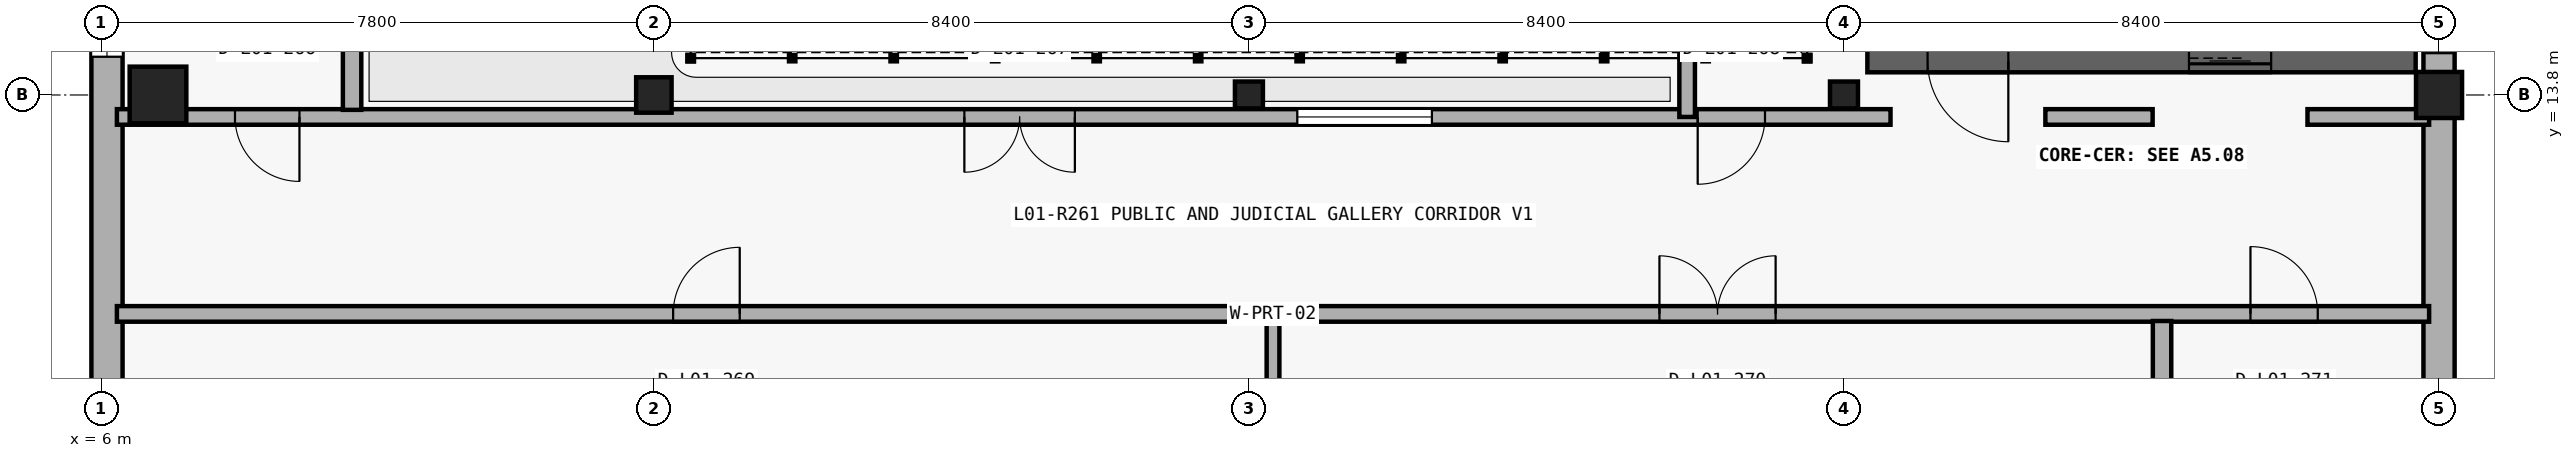
"""IFC4 building model, lengths in metres.
Left out: names, types, materials, properties, quantities, classifications, styles, units other than length and angle.
Written with IfcOpenShell. Run it as: python <this file> out.ifc"""

import sys

from ifc_helpers import new_model, si_unit, direction, frame, frame_2d, origin_with_axes, origin_2d_with_axis, place, context, subcontext, project, spatial, rectangle, circle, i_section, extrude, element, fill, save


model = new_model("IFC4")
c1 = context("Model", 3, precision=1e-05, world=origin_with_axes(), true_north=direction((0.0, 1.0)))
c2 = subcontext(c1, "Body", "Model", "MODEL_VIEW")
j1 = project(units=[si_unit("LENGTHUNIT", "METRE"), si_unit("PLANEANGLEUNIT", "RADIAN")], contexts=[c1])
p1 = place(None, origin_with_axes())
s1 = spatial("IfcSite", under=j1, at=p1, CompositionType="ELEMENT")
p2 = place(p1, origin_with_axes())
s2 = spatial("IfcBuilding", under=s1, at=p2, CompositionType="ELEMENT")
p3 = place(p2, frame((0.0, 0.0, 5.4), z_axis=(0.0, 0.0, 1.0), x_axis=(1.0, 0.0, 0.0)))
s3 = spatial("IfcBuildingStorey", under=s2, at=p3, CompositionType="ELEMENT", Elevation=5.4)
p4 = place(None, frame((39.0, 6.34, 5.4), z_axis=(0.0, 0.0, 1.0), x_axis=(0.0, 1.0, 0.0)))
e1 = element("IfcWall", 1, at=p4, inside=s3, PredefinedType="SOLIDWALL", context=c2, shape_type="SweptSolid", body=[
    extrude(rectangle(XDim=23.95, YDim=0.44, at=frame_2d((11.975, 0.0), x_axis=(1.0, 0.0))), origin_with_axes(), (0.0, 0.0, 1.0), 5.1),
])
p5 = place(None, frame((39.0, 9.015, 6.35), z_axis=(0.0, 0.0, 1.0), x_axis=(0.0, 1.0, 0.0)))
e2 = element("IfcOpeningElement", 2, at=p5, cuts=e1, PredefinedType="OPENING", context=c2, shape_type="SweptSolid", body=[
    extrude(rectangle(XDim=0.95, YDim=1.95, at=frame_2d((0.0, 0.975), x_axis=(1.0, 0.0))), frame((0.0, 0.23, 0.0), z_axis=(0.0, -1.0, 0.0), x_axis=(1.0, 0.0, 0.0)), (0.0, 0.0, 1.0), 0.46),
])
p6 = place(None, frame((39.0, 15.19, 6.25), z_axis=(0.0, 0.0, 1.0), x_axis=(0.0, 1.0, 0.0)))
e3 = element("IfcOpeningElement", 3, at=p6, cuts=e1, PredefinedType="OPENING", context=c2, shape_type="SweptSolid", body=[
    extrude(rectangle(XDim=1.6, YDim=3.1, at=frame_2d((0.0, 1.55), x_axis=(1.0, 0.0))), frame((0.0, 0.23, 0.0), z_axis=(0.0, -1.0, 0.0), x_axis=(1.0, 0.0, 0.0)), (0.0, 0.0, 1.0), 0.46),
])
p7 = place(None, frame((39.0, 18.065, 6.3), z_axis=(0.0, 0.0, 1.0), x_axis=(0.0, 1.0, 0.0)))
e4 = element("IfcOpeningElement", 4, at=p7, cuts=e1, PredefinedType="OPENING", context=c2, shape_type="SweptSolid", body=[
    extrude(rectangle(XDim=1.45, YDim=2.85, at=frame_2d((0.0, 1.425), x_axis=(1.0, 0.0))), frame((0.0, 0.23, 0.0), z_axis=(0.0, -1.0, 0.0), x_axis=(1.0, 0.0, 0.0)), (0.0, 0.0, 1.0), 0.46),
])
p8 = place(None, frame((39.0, 24.015, 6.3), z_axis=(0.0, 0.0, 1.0), x_axis=(0.0, 1.0, 0.0)))
e5 = element("IfcOpeningElement", 5, at=p8, cuts=e1, PredefinedType="OPENING", context=c2, shape_type="SweptSolid", body=[
    extrude(rectangle(XDim=1.65, YDim=2.4, at=frame_2d((0.0, 1.2), x_axis=(1.0, 0.0))), frame((0.0, 0.23, 0.0), z_axis=(0.0, -1.0, 0.0), x_axis=(1.0, 0.0, 0.0)), (0.0, 0.0, 1.0), 0.46),
])
p9 = place(None, frame((6.08, 30.34, 5.4), z_axis=(0.0, 0.0, 1.0), x_axis=(0.0, -1.0, 0.0)))
e6 = element("IfcWall", 6, at=p9, inside=s3, PredefinedType="SOLIDWALL", context=c2, shape_type="SweptSolid", body=[
    extrude(rectangle(XDim=24.0, YDim=0.44, at=frame_2d((12.0, 0.0), x_axis=(1.0, 0.0))), origin_with_axes(), (0.0, 0.0, 1.0), 5.1),
])
p10 = place(None, frame((6.08, 27.54, 6.5), z_axis=(0.0, 0.0, 1.0), x_axis=(0.0, -1.0, 0.0)))
e7 = element("IfcOpeningElement", 7, at=p10, cuts=e6, PredefinedType="OPENING", context=c2, shape_type="SweptSolid", body=[
    extrude(rectangle(XDim=1.2, YDim=3.4, at=frame_2d((0.0, 1.7), x_axis=(1.0, 0.0))), frame((0.0, 0.23, 0.0), z_axis=(0.0, -1.0, 0.0), x_axis=(1.0, 0.0, 0.0)), (0.0, 0.0, 1.0), 0.46),
])
p11 = place(None, frame((6.08, 24.14, 6.25), z_axis=(0.0, 0.0, 1.0), x_axis=(0.0, -1.0, 0.0)))
e8 = element("IfcOpeningElement", 8, at=p11, cuts=e6, PredefinedType="OPENING", context=c2, shape_type="SweptSolid", body=[
    extrude(rectangle(XDim=2.1, YDim=3.3, at=frame_2d((0.0, 1.65), x_axis=(1.0, 0.0))), frame((0.0, 0.23, 0.0), z_axis=(0.0, -1.0, 0.0), x_axis=(1.0, 0.0, 0.0)), (0.0, 0.0, 1.0), 0.46),
])
p12 = place(None, frame((6.08, 18.44, 6.3), z_axis=(0.0, 0.0, 1.0), x_axis=(0.0, -1.0, 0.0)))
e9 = element("IfcOpeningElement", 9, at=p12, cuts=e6, PredefinedType="OPENING", context=c2, shape_type="SweptSolid", body=[
    extrude(rectangle(XDim=1.8, YDim=3.0, at=frame_2d((0.0, 1.5), x_axis=(1.0, 0.0))), frame((0.0, 0.23, 0.0), z_axis=(0.0, -1.0, 0.0), x_axis=(1.0, 0.0, 0.0)), (0.0, 0.0, 1.0), 0.46),
])
p13 = place(None, frame((6.08, 15.09, 6.3), z_axis=(0.0, 0.0, 1.0), x_axis=(0.0, -1.0, 0.0)))
e10 = element("IfcOpeningElement", 10, at=p13, cuts=e6, PredefinedType="OPENING", context=c2, shape_type="SweptSolid", body=[
    extrude(rectangle(XDim=1.5, YDim=2.7, at=frame_2d((0.0, 1.35), x_axis=(1.0, 0.0))), frame((0.0, 0.23, 0.0), z_axis=(0.0, -1.0, 0.0), x_axis=(1.0, 0.0, 0.0)), (0.0, 0.0, 1.0), 0.46),
])
p14 = place(None, frame((30.93, 14.28, 5.4), z_axis=(0.0, 0.0, 1.0), x_axis=(1.0, 0.0, 0.0)))
e11 = element("IfcWall", 11, at=p14, inside=s3, PredefinedType="SHEAR", context=c2, shape_type="SweptSolid", body=[
    extrude(rectangle(XDim=7.74, YDim=0.32, at=frame_2d((3.87, 0.0), x_axis=(1.0, 0.0))), origin_with_axes(), (0.0, 0.0, 1.0), 5.4),
])
p15 = place(None, frame((32.35, 14.28, 5.4), z_axis=(0.0, 0.0, 1.0), x_axis=(1.0, 0.0, 0.0)))
e12 = element("IfcOpeningElement", 12, at=p15, cuts=e11, PredefinedType="OPENING", context=c2, shape_type="SweptSolid", body=[
    extrude(rectangle(XDim=1.14, YDim=2.18, at=frame_2d((0.0, 1.09), x_axis=(1.0, 0.0))), frame((0.0, 0.17, 0.0), z_axis=(0.0, -1.0, 0.0), x_axis=(1.0, 0.0, 0.0)), (0.0, 0.0, 1.0), 0.34),
])
p16 = place(None, frame((36.05, 14.28, 5.4), z_axis=(0.0, 0.0, 1.0), x_axis=(1.0, 0.0, 0.0)))
e13 = element("IfcOpeningElement", 13, at=p16, cuts=e11, PredefinedType="OPENING", context=c2, shape_type="SweptSolid", body=[
    extrude(rectangle(XDim=1.16, YDim=2.2, at=frame_2d((0.0, 1.1), x_axis=(1.0, 0.0))), frame((0.0, 0.17, 0.0), z_axis=(0.0, -1.0, 0.0), x_axis=(1.0, 0.0, 0.0)), (0.0, 0.0, 1.0), 0.34),
])
p17 = place(None, frame((6.22, 13.49, 5.4), z_axis=(0.0, 0.0, 1.0), x_axis=(1.0, 0.0, 0.0)))
e14 = element("IfcWall", 14, at=p17, inside=s3, PredefinedType="PARTITIONING", context=c2, shape_type="SweptSolid", body=[
    extrude(rectangle(XDim=25.037, YDim=0.22, at=frame_2d((12.518, 0.0), x_axis=(1.0, 0.0))), origin_with_axes(), (0.0, 0.0, 1.0), 5.08),
])
p18 = place(None, frame((8.342, 13.49, 5.4), z_axis=(0.0, 0.0, 1.0), x_axis=(1.0, 0.0, 0.0)))
e15 = element("IfcOpeningElement", 15, at=p18, cuts=e14, PredefinedType="OPENING", context=c2, shape_type="SweptSolid", body=[
    extrude(rectangle(XDim=0.91, YDim=2.12, at=frame_2d((0.0, 1.06), x_axis=(1.0, 0.0))), frame((0.0, 0.12, 0.0), z_axis=(0.0, -1.0, 0.0), x_axis=(1.0, 0.0, 0.0)), (0.0, 0.0, 1.0), 0.24),
])
p19 = place(None, frame((18.963, 13.49, 5.4), z_axis=(0.0, 0.0, 1.0), x_axis=(1.0, 0.0, 0.0)))
e16 = element("IfcOpeningElement", 16, at=p19, cuts=e14, PredefinedType="OPENING", context=c2, shape_type="SweptSolid", body=[
    extrude(rectangle(XDim=1.56, YDim=2.28, at=frame_2d((0.0, 1.14), x_axis=(1.0, 0.0))), frame((0.0, 0.12, 0.0), z_axis=(0.0, -1.0, 0.0), x_axis=(1.0, 0.0, 0.0)), (0.0, 0.0, 1.0), 0.24),
])
p20 = place(None, frame((29.01, 13.49, 5.4), z_axis=(0.0, 0.0, 1.0), x_axis=(1.0, 0.0, 0.0)))
e17 = element("IfcOpeningElement", 17, at=p20, cuts=e14, PredefinedType="OPENING", context=c2, shape_type="SweptSolid", body=[
    extrude(rectangle(XDim=0.95, YDim=2.16, at=frame_2d((0.0, 1.08), x_axis=(1.0, 0.0))), frame((0.0, 0.12, 0.0), z_axis=(0.0, -1.0, 0.0), x_axis=(1.0, 0.0, 0.0)), (0.0, 0.0, 1.0), 0.24),
])
p21 = place(None, frame((23.833, 13.49, 6.45), z_axis=(0.0, 0.0, 1.0), x_axis=(1.0, 0.0, 0.0)))
e18 = element("IfcOpeningElement", 18, at=p21, cuts=e14, PredefinedType="OPENING", context=c2, shape_type="SweptSolid", body=[
    extrude(rectangle(XDim=1.9, YDim=1.5, at=frame_2d((0.0, 0.75), x_axis=(1.0, 0.0))), frame((0.0, 0.12, 0.0), z_axis=(0.0, -1.0, 0.0), x_axis=(1.0, 0.0, 0.0)), (0.0, 0.0, 1.0), 0.24),
])
p22 = place(None, frame((33.443, 13.49, 5.4), z_axis=(0.0, 0.0, 1.0), x_axis=(1.0, 0.0, 0.0)))
e19 = element("IfcWall", 19, at=p22, inside=s3, PredefinedType="PARTITIONING", context=c2, shape_type="SweptSolid", body=[
    extrude(rectangle(XDim=1.514, YDim=0.22, at=frame_2d((0.757, 0.0), x_axis=(1.0, 0.0))), origin_with_axes(), (0.0, 0.0, 1.0), 5.08),
])
p23 = place(None, frame((37.143, 13.49, 5.4), z_axis=(0.0, 0.0, 1.0), x_axis=(1.0, 0.0, 0.0)))
e20 = element("IfcWall", 20, at=p23, inside=s3, PredefinedType="PARTITIONING", context=c2, shape_type="SweptSolid", body=[
    extrude(rectangle(XDim=1.717, YDim=0.22, at=frame_2d((0.859, 0.0), x_axis=(1.0, 0.0))), origin_with_axes(), (0.0, 0.0, 1.0), 5.08),
])
p24 = place(None, frame((6.22, 10.71, 5.4), z_axis=(0.0, 0.0, 1.0), x_axis=(1.0, 0.0, 0.0)))
e21 = element("IfcWall", 21, at=p24, inside=s3, PredefinedType="PARTITIONING", context=c2, shape_type="SweptSolid", body=[
    extrude(rectangle(XDim=32.64, YDim=0.22, at=frame_2d((16.32, 0.0), x_axis=(1.0, 0.0))), origin_with_axes(), (0.0, 0.0, 1.0), 5.08),
])
p25 = place(None, frame((14.542, 10.71, 5.4), z_axis=(0.0, 0.0, 1.0), x_axis=(1.0, 0.0, 0.0)))
e22 = element("IfcOpeningElement", 22, at=p25, cuts=e21, PredefinedType="OPENING", context=c2, shape_type="SweptSolid", body=[
    extrude(rectangle(XDim=0.94, YDim=2.3, at=frame_2d((0.0, 1.15), x_axis=(1.0, 0.0))), frame((0.0, 0.12, 0.0), z_axis=(0.0, -1.0, 0.0), x_axis=(1.0, 0.0, 0.0)), (0.0, 0.0, 1.0), 0.24),
])
p26 = place(None, frame((28.815, 10.71, 5.4), z_axis=(0.0, 0.0, 1.0), x_axis=(1.0, 0.0, 0.0)))
e23 = element("IfcOpeningElement", 23, at=p26, cuts=e21, PredefinedType="OPENING", context=c2, shape_type="SweptSolid", body=[
    extrude(rectangle(XDim=1.64, YDim=2.42, at=frame_2d((0.0, 1.21), x_axis=(1.0, 0.0))), frame((0.0, 0.12, 0.0), z_axis=(0.0, -1.0, 0.0), x_axis=(1.0, 0.0, 0.0)), (0.0, 0.0, 1.0), 0.24),
])
p27 = place(None, frame((36.813, 10.71, 5.4), z_axis=(0.0, 0.0, 1.0), x_axis=(1.0, 0.0, 0.0)))
e24 = element("IfcOpeningElement", 24, at=p27, cuts=e21, PredefinedType="OPENING", context=c2, shape_type="SweptSolid", body=[
    extrude(rectangle(XDim=0.95, YDim=2.1, at=frame_2d((0.0, 1.05), x_axis=(1.0, 0.0))), frame((0.0, 0.12, 0.0), z_axis=(0.0, -1.0, 0.0), x_axis=(1.0, 0.0, 0.0)), (0.0, 0.0, 1.0), 0.24),
])
p28 = place(None, frame((9.54, 13.59, 5.4), z_axis=(0.0, 0.0, 1.0), x_axis=(0.0, 1.0, 0.0)))
e25 = element("IfcWall", 25, at=p28, inside=s3, PredefinedType="PLUMBINGWALL", context=c2, shape_type="SweptSolid", body=[
    extrude(rectangle(XDim=16.83, YDim=0.26, at=frame_2d((8.415, 0.0), x_axis=(1.0, 0.0))), origin_with_axes(), (0.0, 0.0, 1.0), 5.08),
])
p29 = place(None, frame((35.09, 6.26, 5.4), z_axis=(0.0, 0.0, 1.0), x_axis=(0.0, 1.0, 0.0)))
e26 = element("IfcWall", 26, at=p29, inside=s3, PredefinedType="PLUMBINGWALL", context=c2, shape_type="SweptSolid", body=[
    extrude(rectangle(XDim=4.35, YDim=0.26, at=frame_2d((2.175, 0.0), x_axis=(1.0, 0.0))), origin_with_axes(), (0.0, 0.0, 1.0), 5.08),
])
p30 = place(None, frame((28.386, 13.49, 5.4), z_axis=(0.0, 0.0, 1.0), x_axis=(0.0, 1.0, 0.0)))
e27 = element("IfcWall", 27, at=p30, inside=s3, PredefinedType="PARTITIONING", context=c2, shape_type="SweptSolid", body=[
    extrude(rectangle(XDim=1.41, YDim=0.22, at=frame_2d((0.705, 0.0), x_axis=(1.0, 0.0))), origin_with_axes(), (0.0, 0.0, 1.0), 5.08),
])
p31 = place(None, frame((22.54, 6.22, 5.4), z_axis=(0.0, 0.0, 1.0), x_axis=(0.0, 1.0, 0.0)))
e28 = element("IfcWall", 28, at=p31, inside=s3, PredefinedType="PARTITIONING", context=c2, shape_type="SweptSolid", body=[
    extrude(rectangle(XDim=4.49, YDim=0.18, at=frame_2d((2.245, 0.0), x_axis=(1.0, 0.0))), origin_with_axes(), (0.0, 0.0, 1.0), 5.08),
])
p32 = place(None, frame((6.8, 13.8, 5.4), z_axis=(0.0, 0.0, 1.0), x_axis=(1.0, 0.0, 0.0)))
e29 = element("IfcColumn", 29, at=p32, inside=s3, PredefinedType="COLUMN", context=c2, shape_type="SweptSolid", body=[
    extrude(circle(Radius=0.4, at=origin_2d_with_axis()), origin_with_axes(), (0.0, 0.0, 1.0), 5.4),
])
p33 = place(None, frame((13.8, 13.8, 5.4), z_axis=(0.0, 0.0, 1.0), x_axis=(1.0, 0.0, 0.0)))
e30 = element("IfcColumn", 30, at=p33, inside=s3, PredefinedType="COLUMN", context=c2, shape_type="SweptSolid", body=[
    extrude(i_section(OverallWidth=0.5, OverallDepth=0.5, WebThickness=0.022, FlangeThickness=0.036, at=origin_2d_with_axis()), origin_with_axes(), (0.0, 0.0, 1.0), 5.4),
])
for number, where, z_axis, x_axis in (
    (31, (22.2, 13.8, 5.4), (0.0, 0.0, 1.0), (1.0, 0.0, 0.0)),
    (32, (30.6, 13.8, 5.4), (0.0, 0.0, 1.0), (1.0, 0.0, 0.0)),
):
    element("IfcColumn", number, at=place(None, frame(where, z_axis=z_axis, x_axis=x_axis)), inside=s3, PredefinedType="COLUMN", context=c2, shape_type="SweptSolid", body=[
        extrude(i_section(OverallWidth=0.395, OverallDepth=0.38, WebThickness=0.019, FlangeThickness=0.03, at=origin_2d_with_axis()), origin_with_axes(), (0.0, 0.0, 1.0), 5.4),
    ])
p34 = place(None, frame((39.0, 13.8, 5.4), z_axis=(0.0, 0.0, 1.0), x_axis=(1.0, 0.0, 0.0)))
e33 = element("IfcColumn", 33, at=p34, inside=s3, PredefinedType="COLUMN", context=c2, shape_type="SweptSolid", body=[
    extrude(circle(Radius=0.325, at=origin_2d_with_axis()), origin_with_axes(), (0.0, 0.0, 1.0), 5.4),
])
p35 = place(None, frame((32.35, 14.28, 5.4), z_axis=(0.0, 0.0, 1.0), x_axis=(-1.0, 0.0, 0.0)))
e34 = element("IfcDoor", 34, at=p35, inside=s3, OperationType="SINGLE_SWING_RIGHT", PredefinedType="DOOR", context=c2, shape_type="SweptSolid", body=[
    extrude(rectangle(XDim=1.14, YDim=2.18, at=frame_2d((0.0, 1.09), x_axis=(1.0, 0.0))), frame((0.0, 0.04, 0.0), z_axis=(0.0, -1.0, 0.0), x_axis=(1.0, 0.0, 0.0)), (0.0, 0.0, 1.0), 0.08),
])
fill(e12, e34)
p36 = place(None, frame((36.05, 14.28, 5.4), z_axis=(0.0, 0.0, 1.0), x_axis=(-1.0, 0.0, 0.0)))
e35 = element("IfcDoor", 35, at=p36, inside=s3, OperationType="SLIDING_TO_LEFT", PredefinedType="DOOR", context=c2, shape_type="SweptSolid", body=[
    extrude(rectangle(XDim=1.16, YDim=2.2, at=frame_2d((0.0, 1.1), x_axis=(1.0, 0.0))), frame((0.0, 0.04, 0.0), z_axis=(0.0, -1.0, 0.0), x_axis=(1.0, 0.0, 0.0)), (0.0, 0.0, 1.0), 0.08),
])
fill(e13, e35)
p37 = place(None, frame((8.342, 13.49, 5.4), z_axis=(0.0, 0.0, 1.0), x_axis=(-1.0, 0.0, 0.0)))
e36 = element("IfcDoor", 36, at=p37, inside=s3, OperationType="SINGLE_SWING_RIGHT", PredefinedType="DOOR", context=c2, shape_type="SweptSolid", body=[
    extrude(rectangle(XDim=0.91, YDim=2.12, at=frame_2d((0.0, 1.06), x_axis=(1.0, 0.0))), frame((0.0, 0.04, 0.0), z_axis=(0.0, -1.0, 0.0), x_axis=(1.0, 0.0, 0.0)), (0.0, 0.0, 1.0), 0.08),
])
fill(e15, e36)
p38 = place(None, frame((18.963, 13.49, 5.4), z_axis=(0.0, 0.0, 1.0), x_axis=(-1.0, 0.0, 0.0)))
e37 = element("IfcDoor", 37, at=p38, inside=s3, OperationType="DOUBLE_DOOR_SINGLE_SWING", PredefinedType="DOOR", context=c2, shape_type="SweptSolid", body=[
    extrude(rectangle(XDim=1.56, YDim=2.28, at=frame_2d((0.0, 1.14), x_axis=(1.0, 0.0))), frame((0.0, 0.04, 0.0), z_axis=(0.0, -1.0, 0.0), x_axis=(1.0, 0.0, 0.0)), (0.0, 0.0, 1.0), 0.08),
])
fill(e16, e37)
p39 = place(None, frame((29.01, 13.49, 5.4), z_axis=(0.0, 0.0, 1.0), x_axis=(-1.0, 0.0, 0.0)))
e38 = element("IfcDoor", 38, at=p39, inside=s3, OperationType="SINGLE_SWING_LEFT", PredefinedType="DOOR", context=c2, shape_type="SweptSolid", body=[
    extrude(rectangle(XDim=0.95, YDim=2.16, at=frame_2d((0.0, 1.08), x_axis=(1.0, 0.0))), frame((0.0, 0.04, 0.0), z_axis=(0.0, -1.0, 0.0), x_axis=(1.0, 0.0, 0.0)), (0.0, 0.0, 1.0), 0.08),
])
fill(e17, e38)
p40 = place(None, frame((14.542, 10.71, 5.4), z_axis=(0.0, 0.0, 1.0), x_axis=(1.0, 0.0, 0.0)))
e39 = element("IfcDoor", 39, at=p40, inside=s3, OperationType="SINGLE_SWING_RIGHT", PredefinedType="DOOR", context=c2, shape_type="SweptSolid", body=[
    extrude(rectangle(XDim=0.94, YDim=2.3, at=frame_2d((0.0, 1.15), x_axis=(1.0, 0.0))), frame((0.0, 0.04, 0.0), z_axis=(0.0, -1.0, 0.0), x_axis=(1.0, 0.0, 0.0)), (0.0, 0.0, 1.0), 0.08),
])
fill(e22, e39)
p41 = place(None, frame((28.815, 10.71, 5.4), z_axis=(0.0, 0.0, 1.0), x_axis=(1.0, 0.0, 0.0)))
e40 = element("IfcDoor", 40, at=p41, inside=s3, OperationType="DOUBLE_DOOR_SINGLE_SWING", PredefinedType="DOOR", context=c2, shape_type="SweptSolid", body=[
    extrude(rectangle(XDim=1.64, YDim=2.42, at=frame_2d((0.0, 1.21), x_axis=(1.0, 0.0))), frame((0.0, 0.04, 0.0), z_axis=(0.0, -1.0, 0.0), x_axis=(1.0, 0.0, 0.0)), (0.0, 0.0, 1.0), 0.08),
])
fill(e23, e40)
p42 = place(None, frame((36.813, 10.71, 5.4), z_axis=(0.0, 0.0, 1.0), x_axis=(1.0, 0.0, 0.0)))
e41 = element("IfcDoor", 41, at=p42, inside=s3, OperationType="SINGLE_SWING_LEFT", PredefinedType="DOOR", context=c2, shape_type="SweptSolid", body=[
    extrude(rectangle(XDim=0.95, YDim=2.1, at=frame_2d((0.0, 1.05), x_axis=(1.0, 0.0))), frame((0.0, 0.04, 0.0), z_axis=(0.0, -1.0, 0.0), x_axis=(1.0, 0.0, 0.0)), (0.0, 0.0, 1.0), 0.08),
])
fill(e24, e41)
p43 = place(None, frame((39.0, 15.19, 6.25), z_axis=(0.0, 0.0, 1.0), x_axis=(0.0, 1.0, 0.0)))
e42 = element("IfcWindow", 42, at=p43, inside=s3, PartitioningType="SINGLE_PANEL", PredefinedType="WINDOW", context=c2, shape_type="SweptSolid", body=[
    extrude(rectangle(XDim=1.6, YDim=3.1, at=frame_2d((0.0, 1.55), x_axis=(1.0, 0.0))), frame((0.0, 0.03, 0.0), z_axis=(0.0, -1.0, 0.0), x_axis=(1.0, 0.0, 0.0)), (0.0, 0.0, 1.0), 0.06),
])
fill(e3, e42)
p44 = place(None, frame((6.08, 15.09, 6.3), z_axis=(0.0, 0.0, 1.0), x_axis=(0.0, -1.0, 0.0)))
e43 = element("IfcWindow", 43, at=p44, inside=s3, PartitioningType="SINGLE_PANEL", PredefinedType="WINDOW", context=c2, shape_type="SweptSolid", body=[
    extrude(rectangle(XDim=1.5, YDim=2.7, at=frame_2d((0.0, 1.35), x_axis=(1.0, 0.0))), frame((0.0, 0.03, 0.0), z_axis=(0.0, -1.0, 0.0), x_axis=(1.0, 0.0, 0.0)), (0.0, 0.0, 1.0), 0.06),
])
fill(e10, e43)
p45 = place(None, frame((23.833, 13.49, 6.45), z_axis=(0.0, 0.0, 1.0), x_axis=(1.0, 0.0, 0.0)))
e44 = element("IfcWindow", 44, at=p45, inside=s3, PartitioningType="SINGLE_PANEL", PredefinedType="WINDOW", context=c2, shape_type="SweptSolid", body=[
    extrude(rectangle(XDim=1.9, YDim=1.5, at=frame_2d((0.0, 0.75), x_axis=(1.0, 0.0))), frame((0.0, 0.03, 0.0), z_axis=(0.0, -1.0, 0.0), x_axis=(1.0, 0.0, 0.0)), (0.0, 0.0, 1.0), 0.06),
])
fill(e18, e44)
save(model, sys.argv[1])
